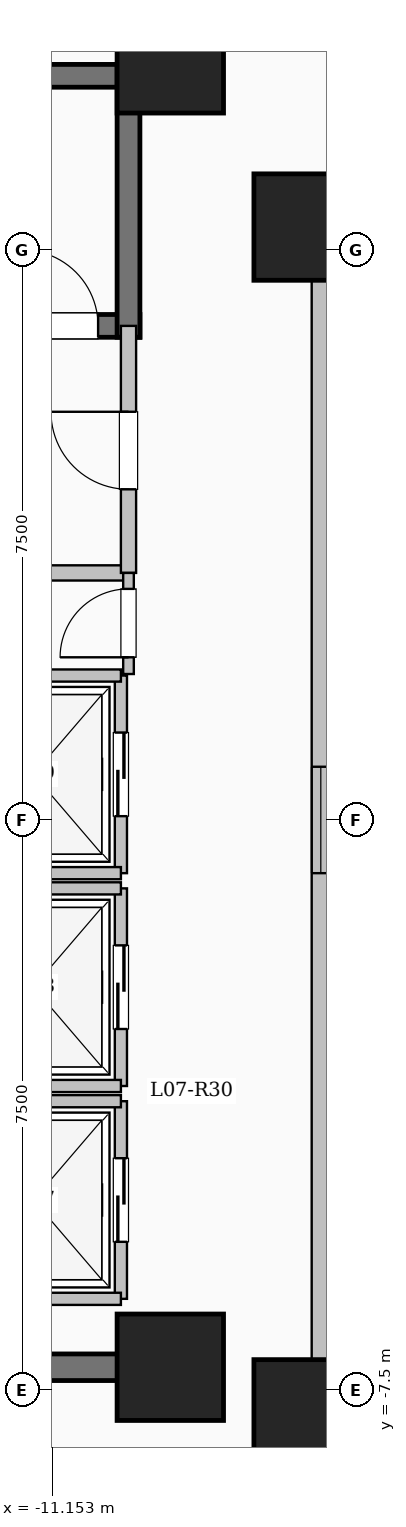
"""IFC4 building model, lengths in metres.
Left out: names, types, materials, properties, quantities, classifications, styles, units other than length and angle.
Written with IfcOpenShell. Run it as: python <this file> out.ifc"""

import sys

from ifc_helpers import new_model, si_unit, direction, frame, frame_2d, origin, origin_2d, place, context, subcontext, project, spatial, rectangle, extrude, element, fill, save


model = new_model("IFC4")
c1 = context("Model", 3, precision=1e-05, world=origin(), true_north=direction((0.0, 1.0)))
c2 = subcontext(c1, "Body", "Model", "MODEL_VIEW")
j1 = project(units=[si_unit("LENGTHUNIT", "METRE"), si_unit("PLANEANGLEUNIT", "RADIAN")], contexts=[c1])
p1 = place(None, origin())
s1 = spatial("IfcSite", under=j1, at=p1, CompositionType="ELEMENT")
p2 = place(p1, origin())
s2 = spatial("IfcBuilding", under=s1, at=p2, CompositionType="ELEMENT")
p3 = place(p2, frame((0.0, 0.0, 30.7)))
s3 = spatial("IfcBuildingStorey", under=s2, at=p3, CompositionType="ELEMENT", Elevation=30.7)
for number, where, z_axis, x_axis in (
    (1, (-7.8, -7.8, 0.0), (0.0, 0.0, 1.0), (1.0, 0.0, 0.0)),
    (2, (-7.8, 7.8, 0.0), (0.0, 0.0, 1.0), (1.0, 0.0, 0.0)),
    (3, (-9.6, -7.2, 0.0), (0.0, 0.0, 1.0), (1.0, 0.0, 0.0)),
    (4, (-9.6, 10.0, 0.0), (0.0, 0.0, 1.0), (1.0, 0.0, 0.0)),
):
    element("IfcColumn", number, at=place(p3, frame(where, z_axis=z_axis, x_axis=x_axis)), inside=s3, PredefinedType="COLUMN", context=c2, shape_type="SweptSolid", body=[
        extrude(rectangle(XDim=1.4, YDim=1.4, at=origin_2d()), origin(), (0.0, 0.0, 1.0), 3.35),
    ])
p4 = place(p3, frame((-7.62, -7.62, 0.0), z_axis=(0.0, 0.0, 1.0), x_axis=(1.0, 0.0, 0.0)))
e5 = element("IfcWall", 5, at=p4, inside=s3, PredefinedType="SOLIDWALL", context=c2, shape_type="SweptSolid", body=[
    extrude(rectangle(XDim=15.24, YDim=0.24, at=frame_2d((7.62, 0.0))), origin(), (0.0, 0.0, 1.0), 3.1),
])
p5 = place(p4, frame((6.92, 0.0, 0.95)))
e6 = element("IfcOpeningElement", 6, at=p5, cuts=e5, PredefinedType="OPENING", context=c2, shape_type="SweptSolid", body=[
    extrude(rectangle(XDim=1.4, YDim=1.5, at=frame_2d((0.7, 0.75))), frame((0.0, 0.13, 0.0), z_axis=(0.0, -1.0, 0.0), x_axis=(1.0, 0.0, 0.0)), (0.0, 0.0, 1.0), 0.26),
])
p6 = place(p3, frame((7.62, 7.62, 0.0), z_axis=(0.0, 0.0, 1.0), x_axis=(-1.0, 0.0, 0.0)))
e7 = element("IfcWall", 7, at=p6, inside=s3, PredefinedType="SOLIDWALL", context=c2, shape_type="SweptSolid", body=[
    extrude(rectangle(XDim=15.24, YDim=0.24, at=frame_2d((7.62, 0.0))), origin(), (0.0, 0.0, 1.0), 3.1),
])
p7 = place(p6, frame((6.92, 0.0, 0.95)))
e8 = element("IfcOpeningElement", 8, at=p7, cuts=e7, PredefinedType="OPENING", context=c2, shape_type="SweptSolid", body=[
    extrude(rectangle(XDim=1.4, YDim=1.5, at=frame_2d((0.7, 0.75))), frame((0.0, 0.13, 0.0), z_axis=(0.0, -1.0, 0.0), x_axis=(1.0, 0.0, 0.0)), (0.0, 0.0, 1.0), 0.26),
])
p8 = place(p3, frame((-7.62, 7.62, 0.0), z_axis=(0.0, 0.0, 1.0), x_axis=(0.0, -1.0, 0.0)))
e9 = element("IfcWall", 9, at=p8, inside=s3, PredefinedType="SOLIDWALL", context=c2, shape_type="SweptSolid", body=[
    extrude(rectangle(XDim=15.24, YDim=0.24, at=frame_2d((7.62, 0.0))), origin(), (0.0, 0.0, 1.0), 3.1),
])
p9 = place(p8, frame((6.92, 0.0, 0.95)))
e10 = element("IfcOpeningElement", 10, at=p9, cuts=e9, PredefinedType="OPENING", context=c2, shape_type="SweptSolid", body=[
    extrude(rectangle(XDim=1.4, YDim=1.5, at=frame_2d((0.7, 0.75))), frame((0.0, 0.13, 0.0), z_axis=(0.0, -1.0, 0.0), x_axis=(1.0, 0.0, 0.0)), (0.0, 0.0, 1.0), 0.26),
])
p10 = place(p3, frame((-18.0, 9.79, 0.0), z_axis=(0.0, 0.0, 1.0), x_axis=(1.0, 0.0, 0.0)))
e11 = element("IfcWall", 11, at=p10, inside=s3, PredefinedType="SHEAR", context=c2, shape_type="SweptSolid", body=[
    extrude(rectangle(XDim=8.0, YDim=0.3, at=frame_2d((4.0, 0.0))), origin(), (0.0, 0.0, 1.0), 3.35),
])
p11 = place(p3, frame((-18.0, 6.5, 0.0), z_axis=(0.0, 0.0, 1.0), x_axis=(1.0, 0.0, 0.0)))
e12 = element("IfcWall", 12, at=p11, inside=s3, PredefinedType="SHEAR", context=c2, shape_type="SweptSolid", body=[
    extrude(rectangle(XDim=8.0, YDim=0.3, at=frame_2d((4.0, 0.0))), origin(), (0.0, 0.0, 1.0), 3.35),
])
p12 = place(p11, frame((6.45, 0.0, 0.0)))
e13 = element("IfcOpeningElement", 13, at=p12, cuts=e12, PredefinedType="OPENING", context=c2, shape_type="SweptSolid", body=[
    extrude(rectangle(XDim=1.0, YDim=2.15, at=frame_2d((0.5, 1.075))), frame((0.0, 0.16, 0.0), z_axis=(0.0, -1.0, 0.0), x_axis=(1.0, 0.0, 0.0)), (0.0, 0.0, 1.0), 0.32),
])
p13 = place(p3, frame((-10.15, 6.35, 0.0), z_axis=(0.0, 0.0, 1.0), x_axis=(0.0, 1.0, 0.0)))
e14 = element("IfcWall", 14, at=p13, inside=s3, PredefinedType="SHEAR", context=c2, shape_type="SweptSolid", body=[
    extrude(rectangle(XDim=3.59, YDim=0.3, at=frame_2d((1.795, 0.0))), origin(), (0.0, 0.0, 1.0), 3.35),
])
p14 = place(p3, frame((-15.55, 3.25, 0.0), z_axis=(0.0, 0.0, 1.0), x_axis=(1.0, 0.0, 0.0)))
e15 = element("IfcWall", 15, at=p14, inside=s3, PredefinedType="SOLIDWALL", context=c2, shape_type="SweptSolid", body=[
    extrude(rectangle(XDim=5.4, YDim=0.2, at=frame_2d((2.7, 0.0))), origin(), (0.0, 0.0, 1.0), 3.1),
])
p15 = place(p3, frame((-10.15, 3.25, 0.0), z_axis=(0.0, 0.0, 1.0), x_axis=(0.0, 1.0, 0.0)))
e16 = element("IfcWall", 16, at=p15, inside=s3, PredefinedType="SOLIDWALL", context=c2, shape_type="SweptSolid", body=[
    extrude(rectangle(XDim=3.25, YDim=0.2, at=frame_2d((1.625, 0.0))), origin(), (0.0, 0.0, 1.0), 3.1),
])
p16 = place(p15, frame((1.1, 0.0, 0.0)))
e17 = element("IfcOpeningElement", 17, at=p16, cuts=e16, PredefinedType="OPENING", context=c2, shape_type="SweptSolid", body=[
    extrude(rectangle(XDim=1.02, YDim=2.15, at=frame_2d((0.51, 1.075))), frame((0.0, 0.11, 0.0), z_axis=(0.0, -1.0, 0.0), x_axis=(1.0, 0.0, 0.0)), (0.0, 0.0, 1.0), 0.22),
])
p17 = place(p3, frame((-10.25, -6.3, 0.0), z_axis=(0.0, 0.0, 1.0), x_axis=(0.0, 1.0, 0.0)))
e18 = element("IfcWall", 18, at=p17, inside=s3, PredefinedType="SOLIDWALL", context=c2, shape_type="SweptSolid", body=[
    extrude(rectangle(XDim=2.6, YDim=0.16, at=frame_2d((1.3, 0.0))), origin(), (0.0, 0.0, 1.0), 3.1),
])
p18 = place(p17, frame((0.75, 0.0, 0.0)))
e19 = element("IfcOpeningElement", 19, at=p18, cuts=e18, PredefinedType="OPENING", context=c2, shape_type="SweptSolid", body=[
    extrude(rectangle(XDim=1.1, YDim=2.15, at=frame_2d((0.55, 1.075))), frame((0.0, 0.09, 0.0), z_axis=(0.0, -1.0, 0.0), x_axis=(1.0, 0.0, 0.0)), (0.0, 0.0, 1.0), 0.18),
])
for number, where, z_axis, x_axis in (
    (20, (-12.55, -6.3, 0.0), (0.0, 0.0, 1.0), (1.0, 0.0, 0.0)),
    (21, (-12.55, -3.7, 0.0), (0.0, 0.0, 1.0), (1.0, 0.0, 0.0)),
):
    element("IfcWall", number, at=place(p3, frame(where, z_axis=z_axis, x_axis=x_axis)), inside=s3, PredefinedType="SOLIDWALL", context=c2, shape_type="SweptSolid", body=[
        extrude(rectangle(XDim=2.3, YDim=0.16, at=frame_2d((1.15, 0.0))), origin(), (0.0, 0.0, 1.0), 3.1),
    ])
p19 = place(p3, frame((-10.25, -3.5, 0.0), z_axis=(0.0, 0.0, 1.0), x_axis=(0.0, 1.0, 0.0)))
e22 = element("IfcWall", 22, at=p19, inside=s3, PredefinedType="SOLIDWALL", context=c2, shape_type="SweptSolid", body=[
    extrude(rectangle(XDim=2.6, YDim=0.16, at=frame_2d((1.3, 0.0))), origin(), (0.0, 0.0, 1.0), 3.1),
])
p20 = place(p19, frame((0.75, 0.0, 0.0)))
e23 = element("IfcOpeningElement", 23, at=p20, cuts=e22, PredefinedType="OPENING", context=c2, shape_type="SweptSolid", body=[
    extrude(rectangle(XDim=1.1, YDim=2.15, at=frame_2d((0.55, 1.075))), frame((0.0, 0.09, 0.0), z_axis=(0.0, -1.0, 0.0), x_axis=(1.0, 0.0, 0.0)), (0.0, 0.0, 1.0), 0.18),
])
for number, where, z_axis, x_axis in (
    (24, (-12.55, -3.5, 0.0), (0.0, 0.0, 1.0), (1.0, 0.0, 0.0)),
    (25, (-12.55, -0.9, 0.0), (0.0, 0.0, 1.0), (1.0, 0.0, 0.0)),
):
    element("IfcWall", number, at=place(p3, frame(where, z_axis=z_axis, x_axis=x_axis)), inside=s3, PredefinedType="SOLIDWALL", context=c2, shape_type="SweptSolid", body=[
        extrude(rectangle(XDim=2.3, YDim=0.16, at=frame_2d((1.15, 0.0))), origin(), (0.0, 0.0, 1.0), 3.1),
    ])
p21 = place(p3, frame((-10.25, -0.7, 0.0), z_axis=(0.0, 0.0, 1.0), x_axis=(0.0, 1.0, 0.0)))
e26 = element("IfcWall", 26, at=p21, inside=s3, PredefinedType="SOLIDWALL", context=c2, shape_type="SweptSolid", body=[
    extrude(rectangle(XDim=2.6, YDim=0.16, at=frame_2d((1.3, 0.0))), origin(), (0.0, 0.0, 1.0), 3.1),
])
p22 = place(p21, frame((0.75, 0.0, 0.0)))
e27 = element("IfcOpeningElement", 27, at=p22, cuts=e26, PredefinedType="OPENING", context=c2, shape_type="SweptSolid", body=[
    extrude(rectangle(XDim=1.1, YDim=2.15, at=frame_2d((0.55, 1.075))), frame((0.0, 0.09, 0.0), z_axis=(0.0, -1.0, 0.0), x_axis=(1.0, 0.0, 0.0)), (0.0, 0.0, 1.0), 0.18),
])
for number, where, z_axis, x_axis in (
    (28, (-12.55, -0.7, 0.0), (0.0, 0.0, 1.0), (1.0, 0.0, 0.0)),
    (29, (-12.55, 1.9, 0.0), (0.0, 0.0, 1.0), (1.0, 0.0, 0.0)),
):
    element("IfcWall", number, at=place(p3, frame(where, z_axis=z_axis, x_axis=x_axis)), inside=s3, PredefinedType="SOLIDWALL", context=c2, shape_type="SweptSolid", body=[
        extrude(rectangle(XDim=2.3, YDim=0.16, at=frame_2d((1.15, 0.0))), origin(), (0.0, 0.0, 1.0), 3.1),
    ])
p23 = place(p3, frame((-18.625, -7.2, 0.0), z_axis=(0.0, 0.0, 1.0), x_axis=(1.0, 0.0, 0.0)))
e30 = element("IfcWall", 30, at=p23, inside=s3, PredefinedType="SHEAR", context=c2, shape_type="SweptSolid", body=[
    extrude(rectangle(XDim=8.55, YDim=0.35, at=frame_2d((4.275, 0.0))), origin(), (0.0, 0.0, 1.0), 3.35),
])
p24 = place(p3, frame((-10.15, 1.92, 0.0), z_axis=(0.0, 0.0, 1.0), x_axis=(0.0, 1.0, 0.0)))
e31 = element("IfcWall", 31, at=p24, inside=s3, PredefinedType="PARTITIONING", context=c2, shape_type="SweptSolid", body=[
    extrude(rectangle(XDim=1.33, YDim=0.14, at=frame_2d((0.665, 0.0))), origin(), (0.0, 0.0, 1.0), 3.1),
])
p25 = place(p24, frame((0.22, 0.0, 0.0)))
e32 = element("IfcOpeningElement", 32, at=p25, cuts=e31, PredefinedType="OPENING", context=c2, shape_type="SweptSolid", body=[
    extrude(rectangle(XDim=0.9, YDim=2.08, at=frame_2d((0.45, 1.04))), frame((0.0, 0.08, 0.0), z_axis=(0.0, -1.0, 0.0), x_axis=(1.0, 0.0, 0.0)), (0.0, 0.0, 1.0), 0.16),
])
p26 = place(p9, origin())
e33 = element("IfcWindow", 33, at=p26, inside=s3, PartitioningType="SINGLE_PANEL", PredefinedType="WINDOW", context=c2, shape_type="SweptSolid", body=[
    extrude(rectangle(XDim=1.4, YDim=1.5, at=frame_2d((0.7, 0.75))), frame((0.0, 0.03, 0.0), z_axis=(0.0, -1.0, 0.0), x_axis=(1.0, 0.0, 0.0)), (0.0, 0.0, 1.0), 0.06),
])
fill(e10, e33)
p27 = place(p12, origin())
e34 = element("IfcDoor", 34, at=p27, inside=s3, OperationType="SINGLE_SWING_LEFT", PredefinedType="DOOR", context=c2, shape_type="SweptSolid", body=[
    extrude(rectangle(XDim=1.0, YDim=2.15, at=frame_2d((0.5, 1.075))), frame((0.0, 0.025, 0.0), z_axis=(0.0, -1.0, 0.0), x_axis=(1.0, 0.0, 0.0)), (0.0, 0.0, 1.0), 0.05),
])
fill(e13, e34)
p28 = place(p16, origin())
e35 = element("IfcDoor", 35, at=p28, inside=s3, OperationType="SINGLE_SWING_RIGHT", PredefinedType="DOOR", context=c2, shape_type="SweptSolid", body=[
    extrude(rectangle(XDim=1.02, YDim=2.15, at=frame_2d((0.51, 1.075))), frame((0.0, 0.025, 0.0), z_axis=(0.0, -1.0, 0.0), x_axis=(1.0, 0.0, 0.0)), (0.0, 0.0, 1.0), 0.05),
])
fill(e17, e35)
p29 = place(p18, origin())
e36 = element("IfcDoor", 36, at=p29, inside=s3, OperationType="SLIDING_TO_LEFT", PredefinedType="DOOR", context=c2, shape_type="SweptSolid", body=[
    extrude(rectangle(XDim=1.1, YDim=2.15, at=frame_2d((0.55, 1.075))), frame((0.0, 0.025, 0.0), z_axis=(0.0, -1.0, 0.0), x_axis=(1.0, 0.0, 0.0)), (0.0, 0.0, 1.0), 0.05),
])
fill(e19, e36)
p30 = place(p20, origin())
e37 = element("IfcDoor", 37, at=p30, inside=s3, OperationType="SLIDING_TO_LEFT", PredefinedType="DOOR", context=c2, shape_type="SweptSolid", body=[
    extrude(rectangle(XDim=1.1, YDim=2.15, at=frame_2d((0.55, 1.075))), frame((0.0, 0.025, 0.0), z_axis=(0.0, -1.0, 0.0), x_axis=(1.0, 0.0, 0.0)), (0.0, 0.0, 1.0), 0.05),
])
fill(e23, e37)
p31 = place(p22, origin())
e38 = element("IfcDoor", 38, at=p31, inside=s3, OperationType="SLIDING_TO_LEFT", PredefinedType="DOOR", context=c2, shape_type="SweptSolid", body=[
    extrude(rectangle(XDim=1.1, YDim=2.15, at=frame_2d((0.55, 1.075))), frame((0.0, 0.025, 0.0), z_axis=(0.0, -1.0, 0.0), x_axis=(1.0, 0.0, 0.0)), (0.0, 0.0, 1.0), 0.05),
])
fill(e27, e38)
p32 = place(p25, origin())
e39 = element("IfcDoor", 39, at=p32, inside=s3, OperationType="SINGLE_SWING_LEFT", PredefinedType="DOOR", context=c2, shape_type="SweptSolid", body=[
    extrude(rectangle(XDim=0.9, YDim=2.08, at=frame_2d((0.45, 1.04))), frame((0.0, 0.025, 0.0), z_axis=(0.0, -1.0, 0.0), x_axis=(1.0, 0.0, 0.0)), (0.0, 0.0, 1.0), 0.05),
])
fill(e32, e39)
save(model, sys.argv[1])
